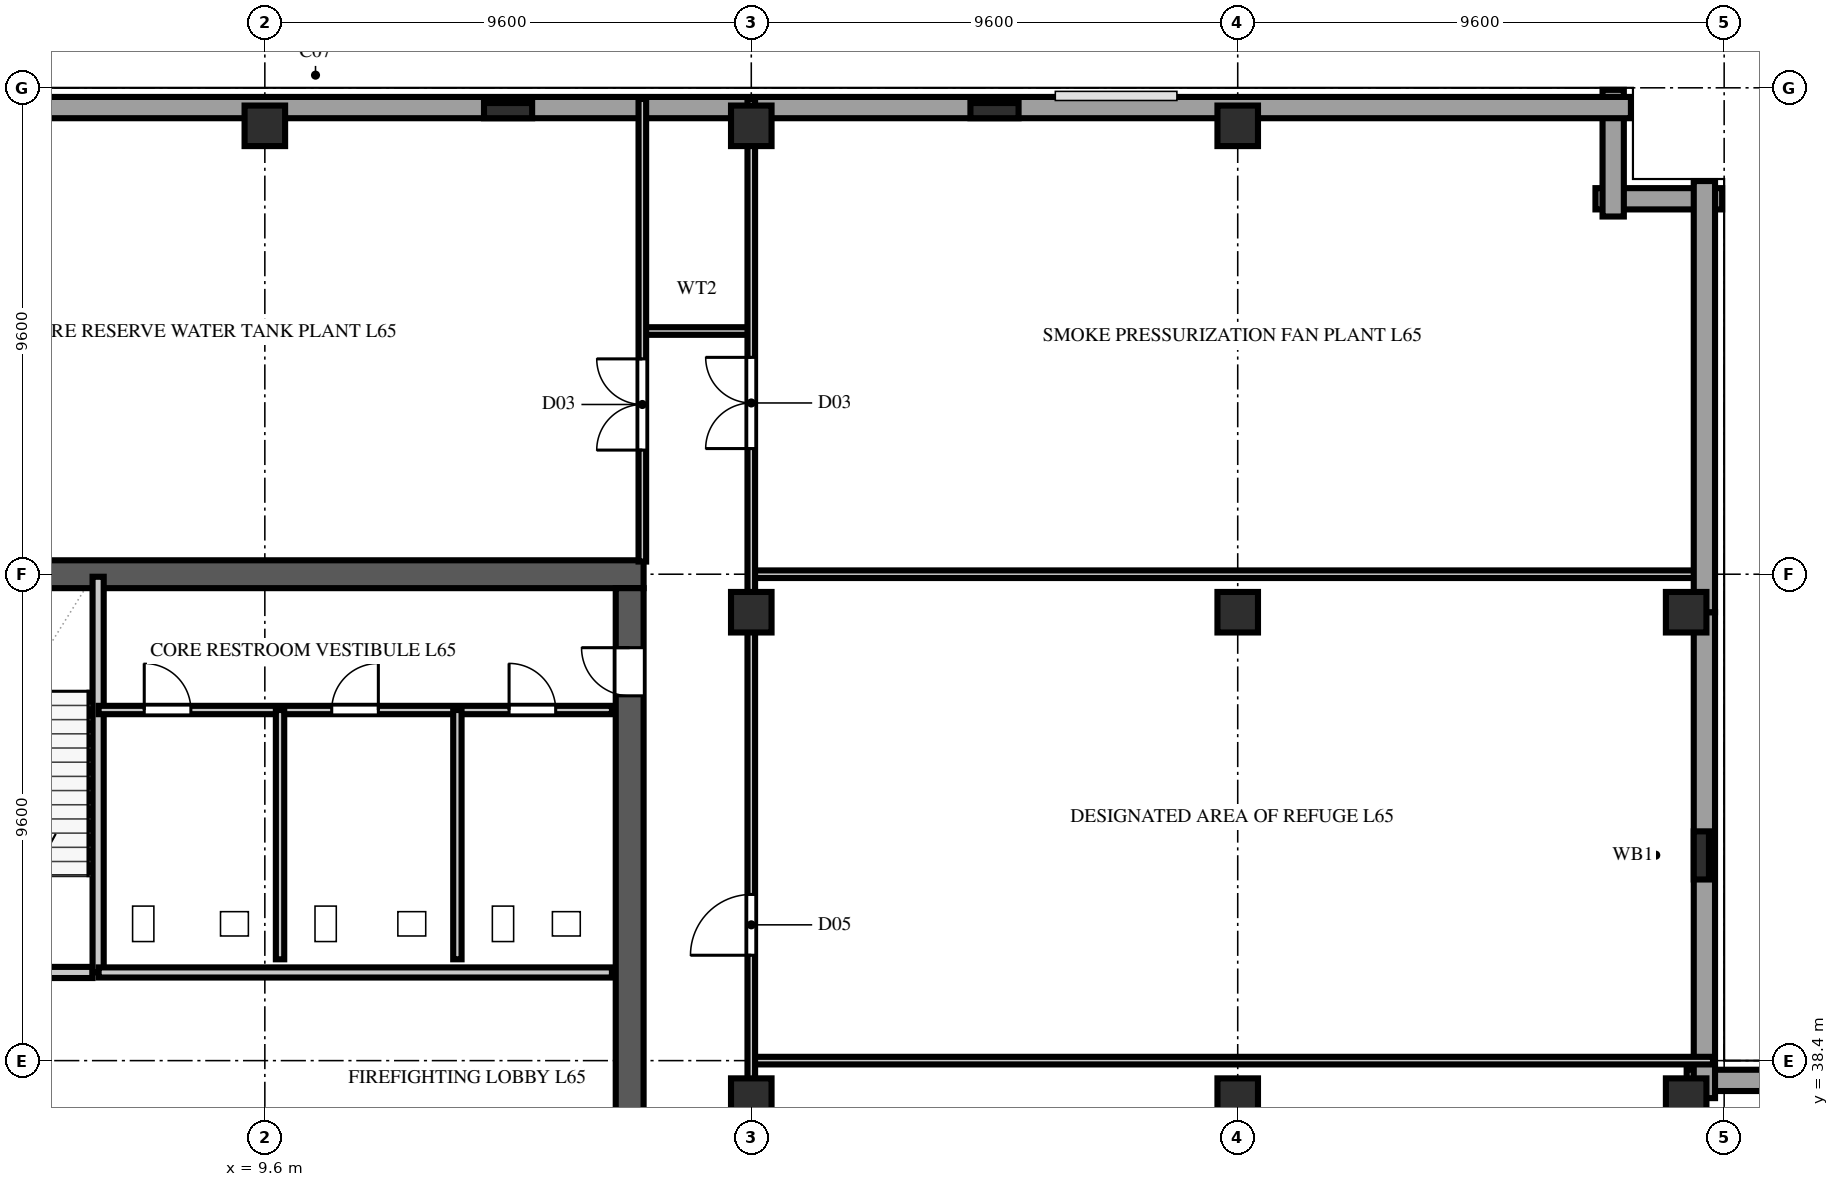
"""IFC4 building model, lengths in metres.
Left out: names, types, materials, properties, quantities, classifications, styles, units other than length and angle.
Written with IfcOpenShell. Run it as: python <this file> out.ifc"""

import sys

from ifc_helpers import new_model, si_unit, direction, frame, frame_2d, origin, origin_2d, place, context, subcontext, project, spatial, rectangle, extrude, element, fill, save


model = new_model("IFC4")
c1 = context("Model", 3, precision=1e-05, world=origin(), true_north=direction((0.0, 1.0)))
c2 = subcontext(c1, "Body", "Model", "MODEL_VIEW")
j1 = project(units=[si_unit("LENGTHUNIT", "METRE"), si_unit("PLANEANGLEUNIT", "RADIAN")], contexts=[c1])
p1 = place(None, origin())
s1 = spatial("IfcSite", under=j1, at=p1, CompositionType="ELEMENT")
p2 = place(p1, origin())
s2 = spatial("IfcBuilding", under=s1, at=p2, CompositionType="ELEMENT")
p3 = place(p2, frame((0.0, 0.0, 256.0)))
s3 = spatial("IfcBuildingStorey", under=s2, at=p3, CompositionType="ELEMENT", Elevation=256.0)
p4 = place(p3, frame((2.475, 48.0, 0.0), z_axis=(0.0, 0.0, 1.0), x_axis=(1.0, 0.0, 0.0)))
e1 = element("IfcWall", 1, at=p4, inside=s3, PredefinedType="SHEAR", context=c2, shape_type="SweptSolid", body=[
    extrude(rectangle(XDim=14.6, YDim=0.55, at=frame_2d((7.3, 0.0))), origin(), (0.0, 0.0, 1.0), 4.74),
])
p5 = place(p3, frame((16.8, 36.4, 0.0), z_axis=(0.0, 0.0, 1.0), x_axis=(0.0, 1.0, 0.0)))
e2 = element("IfcWall", 2, at=p5, inside=s3, PredefinedType="SHEAR", context=c2, shape_type="SweptSolid", body=[
    extrude(rectangle(XDim=11.325, YDim=0.55, at=frame_2d((5.663, 0.0))), origin(), (0.0, 0.0, 1.0), 4.74),
])
p6 = place(p5, frame((9.2, 0.0, 0.0)))
e3 = element("IfcOpeningElement", 3, at=p6, cuts=e2, PredefinedType="OPENING", context=c2, shape_type="SweptSolid", body=[
    extrude(rectangle(XDim=0.95, YDim=2.15, at=frame_2d((0.475, 1.075))), frame((0.0, 0.287, 0.0), z_axis=(0.0, -1.0, 0.0), x_axis=(1.0, 0.0, 0.0)), (0.0, 0.0, 1.0), 0.574),
])
p7 = place(p3, frame((9.6, 56.85, 0.0), z_axis=(0.0, 0.0, 1.0), x_axis=(1.0, 0.0, 0.0)))
e4 = element("IfcColumn", 4, at=p7, inside=s3, PredefinedType="COLUMN", context=c2, shape_type="SweptSolid", body=[
    extrude(rectangle(XDim=0.8, YDim=0.8, at=origin_2d()), origin(), (0.0, 0.0, 1.0), 4.7),
])
for number, where, z_axis, x_axis in (
    (5, (19.2, 37.65, 0.0), (0.0, 0.0, 1.0), (1.0, 0.0, 0.0)),
    (6, (19.2, 47.25, 0.0), (0.0, 0.0, 1.0), (1.0, 0.0, 0.0)),
):
    element("IfcColumn", number, at=place(p3, frame(where, z_axis=z_axis, x_axis=x_axis)), inside=s3, PredefinedType="COLUMN", context=c2, shape_type="SweptSolid", body=[
        extrude(rectangle(XDim=0.8, YDim=0.8, at=origin_2d()), origin(), (0.0, 0.0, 1.0), 5.0),
    ])
p8 = place(p3, frame((19.2, 56.85, 0.0), z_axis=(0.0, 0.0, 1.0), x_axis=(1.0, 0.0, 0.0)))
e7 = element("IfcColumn", 7, at=p8, inside=s3, PredefinedType="COLUMN", context=c2, shape_type="SweptSolid", body=[
    extrude(rectangle(XDim=0.8, YDim=0.8, at=origin_2d()), origin(), (0.0, 0.0, 1.0), 4.7),
])
for number, where, z_axis, x_axis in (
    (8, (28.8, 37.65, 0.0), (0.0, 0.0, 1.0), (1.0, 0.0, 0.0)),
    (9, (28.8, 47.25, 0.0), (0.0, 0.0, 1.0), (1.0, 0.0, 0.0)),
):
    element("IfcColumn", number, at=place(p3, frame(where, z_axis=z_axis, x_axis=x_axis)), inside=s3, PredefinedType="COLUMN", context=c2, shape_type="SweptSolid", body=[
        extrude(rectangle(XDim=0.8, YDim=0.8, at=origin_2d()), origin(), (0.0, 0.0, 1.0), 5.0),
    ])
p9 = place(p3, frame((28.8, 56.85, 0.0), z_axis=(0.0, 0.0, 1.0), x_axis=(1.0, 0.0, 0.0)))
e10 = element("IfcColumn", 10, at=p9, inside=s3, PredefinedType="COLUMN", context=c2, shape_type="SweptSolid", body=[
    extrude(rectangle(XDim=0.8, YDim=0.8, at=origin_2d()), origin(), (0.0, 0.0, 1.0), 4.7),
])
for number, where, z_axis, x_axis in (
    (11, (37.65, 37.65, 0.0), (0.0, 0.0, 1.0), (1.0, 0.0, 0.0)),
    (12, (37.65, 47.25, 0.0), (0.0, 0.0, 1.0), (1.0, 0.0, 0.0)),
):
    element("IfcColumn", number, at=place(p3, frame(where, z_axis=z_axis, x_axis=x_axis)), inside=s3, PredefinedType="COLUMN", context=c2, shape_type="SweptSolid", body=[
        extrude(rectangle(XDim=0.8, YDim=0.8, at=origin_2d()), origin(), (0.0, 0.0, 1.0), 5.0),
    ])
for number, where, z_axis, x_axis in (
    (13, (14.4, 57.15, 0.0), (0.0, 0.0, 1.0), (1.0, 0.0, 0.0)),
    (14, (24.0, 57.15, 0.0), (0.0, 0.0, 1.0), (1.0, 0.0, 0.0)),
):
    element("IfcColumn", number, at=place(p3, frame(where, z_axis=z_axis, x_axis=x_axis)), inside=s3, PredefinedType="PILASTER", context=c2, shape_type="SweptSolid", body=[
        extrude(rectangle(XDim=0.95, YDim=0.3, at=origin_2d()), origin(), (0.0, 0.0, 1.0), 4.7),
    ])
p10 = place(p3, frame((37.95, 42.45, 0.0), z_axis=(0.0, 0.0, 1.0), x_axis=(0.0, 1.0, 0.0)))
e15 = element("IfcColumn", 15, at=p10, inside=s3, PredefinedType="PILASTER", context=c2, shape_type="SweptSolid", body=[
    extrude(rectangle(XDim=0.95, YDim=0.3, at=origin_2d()), origin(), (0.0, 0.0, 1.0), 5.0),
])
p11 = place(p3, frame((55.76, 38.01, 0.0), z_axis=(0.0, 0.0, 1.0), x_axis=(-1.0, 0.0, 0.0)))
e16 = element("IfcWall", 16, at=p11, inside=s3, PredefinedType="SOLIDWALL", context=c2, shape_type="SweptSolid", body=[
    extrude(rectangle(XDim=18.1, YDim=0.42, at=frame_2d((9.05, 0.0))), origin(), (0.0, 0.0, 1.0), 4.74),
])
p12 = place(p3, frame((38.01, 37.66, 0.0), z_axis=(0.0, 0.0, 1.0), x_axis=(0.0, 1.0, 0.0)))
e17 = element("IfcWall", 17, at=p12, inside=s3, PredefinedType="SOLIDWALL", context=c2, shape_type="SweptSolid", body=[
    extrude(rectangle(XDim=9.59, YDim=0.42, at=frame_2d((4.795, 0.0))), origin(), (0.0, 0.0, 1.0), 3.34),
])
for number, where, z_axis, x_axis in (
    (18, (38.36, 55.41, 0.0), (0.0, 0.0, 1.0), (-1.0, 0.0, 0.0)),
    (19, (36.21, 55.06, 0.0), (0.0, 0.0, 1.0), (0.0, 1.0, 0.0)),
):
    element("IfcWall", number, at=place(p3, frame(where, z_axis=z_axis, x_axis=x_axis)), inside=s3, PredefinedType="SOLIDWALL", context=c2, shape_type="SweptSolid", body=[
        extrude(rectangle(XDim=2.5, YDim=0.42, at=frame_2d((1.25, 0.0))), origin(), (0.0, 0.0, 1.0), 4.7),
    ])
p13 = place(p3, frame((36.56, 57.21, 0.0), z_axis=(0.0, 0.0, 1.0), x_axis=(-1.0, 0.0, 0.0)))
e20 = element("IfcWall", 20, at=p13, inside=s3, PredefinedType="SOLIDWALL", context=c2, shape_type="SweptSolid", body=[
    extrude(rectangle(XDim=34.72, YDim=0.42, at=frame_2d((17.36, 0.0))), origin(), (0.0, 0.0, 1.0), 4.7),
])
p14 = place(p3, frame((2.65, 40.14, 0.0), z_axis=(0.0, 0.0, 1.0), x_axis=(1.0, 0.0, 0.0)))
e21 = element("IfcWall", 21, at=p14, inside=s3, PredefinedType="SOLIDWALL", context=c2, shape_type="SweptSolid", body=[
    extrude(rectangle(XDim=3.55, YDim=0.22, at=frame_2d((1.775, 0.0))), origin(), (0.0, 0.0, 1.0), 4.74),
])
p15 = place(p14, frame((1.2, 0.0, 0.0)))
e22 = element("IfcOpeningElement", 22, at=p15, cuts=e21, PredefinedType="OPENING", context=c2, shape_type="SweptSolid", body=[
    extrude(rectangle(XDim=1.1, YDim=2.2, at=frame_2d((0.55, 1.1))), frame((0.0, 0.122, 0.0), z_axis=(0.0, -1.0, 0.0), x_axis=(1.0, 0.0, 0.0)), (0.0, 0.0, 1.0), 0.244),
])
p16 = place(p3, frame((6.31, 40.14, 0.0), z_axis=(0.0, 0.0, 1.0), x_axis=(0.0, 1.0, 0.0)))
e23 = element("IfcWall", 23, at=p16, inside=s3, PredefinedType="SOLIDWALL", context=c2, shape_type="SweptSolid", body=[
    extrude(rectangle(XDim=7.81, YDim=0.22, at=frame_2d((3.905, 0.0))), origin(), (0.0, 0.0, 1.0), 4.74),
])
p17 = place(p3, frame((6.32, 40.14, 0.0), z_axis=(0.0, 0.0, 1.0), x_axis=(1.0, 0.0, 0.0)))
e24 = element("IfcWall", 24, at=p17, inside=s3, PredefinedType="SOLIDWALL", context=c2, shape_type="SweptSolid", body=[
    extrude(rectangle(XDim=10.13, YDim=0.2, at=frame_2d((5.065, 0.0))), origin(), (0.0, 0.0, 1.0), 4.74),
])
p18 = place(p3, frame((6.32, 45.32, 0.0), z_axis=(0.0, 0.0, 1.0), x_axis=(1.0, 0.0, 0.0)))
e25 = element("IfcWall", 25, at=p18, inside=s3, PredefinedType="PLUMBINGWALL", context=c2, shape_type="SweptSolid", body=[
    extrude(rectangle(XDim=10.13, YDim=0.165, at=frame_2d((5.065, 0.0))), origin(), (0.0, 0.0, 1.0), 4.74),
])
p19 = place(p18, frame((0.9, 0.0, 0.0)))
e26 = element("IfcOpeningElement", 26, at=p19, cuts=e25, PredefinedType="OPENING", context=c2, shape_type="SweptSolid", body=[
    extrude(rectangle(XDim=0.92, YDim=2.15, at=frame_2d((0.46, 1.075))), frame((0.0, 0.094, 0.0), z_axis=(0.0, -1.0, 0.0), x_axis=(1.0, 0.0, 0.0)), (0.0, 0.0, 1.0), 0.189),
])
p20 = place(p18, frame((4.6, 0.0, 0.0)))
e27 = element("IfcOpeningElement", 27, at=p20, cuts=e25, PredefinedType="OPENING", context=c2, shape_type="SweptSolid", body=[
    extrude(rectangle(XDim=0.92, YDim=2.15, at=frame_2d((0.46, 1.075))), frame((0.0, 0.094, 0.0), z_axis=(0.0, -1.0, 0.0), x_axis=(1.0, 0.0, 0.0)), (0.0, 0.0, 1.0), 0.189),
])
p21 = place(p18, frame((8.1, 0.0, 0.0)))
e28 = element("IfcOpeningElement", 28, at=p21, cuts=e25, PredefinedType="OPENING", context=c2, shape_type="SweptSolid", body=[
    extrude(rectangle(XDim=0.92, YDim=2.15, at=frame_2d((0.46, 1.075))), frame((0.0, 0.094, 0.0), z_axis=(0.0, -1.0, 0.0), x_axis=(1.0, 0.0, 0.0)), (0.0, 0.0, 1.0), 0.189),
])
for number, where, z_axis, x_axis in (
    (29, (9.9, 40.4, 0.0), (0.0, 0.0, 1.0), (0.0, 1.0, 0.0)),
    (30, (13.4, 40.4, 0.0), (0.0, 0.0, 1.0), (0.0, 1.0, 0.0)),
):
    element("IfcWall", number, at=place(p3, frame(where, z_axis=z_axis, x_axis=x_axis)), inside=s3, PredefinedType="PLUMBINGWALL", context=c2, shape_type="SweptSolid", body=[
        extrude(rectangle(XDim=4.92, YDim=0.165, at=frame_2d((2.46, 0.0))), origin(), (0.0, 0.0, 1.0), 4.74),
    ])
p22 = place(p3, frame((17.05, 52.8, 0.0), z_axis=(0.0, 0.0, 1.0), x_axis=(1.0, 0.0, 0.0)))
e31 = element("IfcWall", 31, at=p22, inside=s3, PredefinedType="PARTITIONING", context=c2, shape_type="SweptSolid", body=[
    extrude(rectangle(XDim=2.15, YDim=0.15, at=frame_2d((1.075, 0.0))), origin(), (0.0, 0.0, 1.0), 4.7),
])
p23 = place(p3, frame((19.2, 38.4, 0.0), z_axis=(0.0, 0.0, 1.0), x_axis=(1.0, 0.0, 0.0)))
e32 = element("IfcWall", 32, at=p23, inside=s3, PredefinedType="PARTITIONING", context=c2, shape_type="SweptSolid", body=[
    extrude(rectangle(XDim=18.98, YDim=0.15, at=frame_2d((9.49, 0.0))), origin(), (0.0, 0.0, 1.0), 4.74),
])
p24 = place(p3, frame((19.2, 48.0, 0.0), z_axis=(0.0, 0.0, 1.0), x_axis=(1.0, 0.0, 0.0)))
e33 = element("IfcWall", 33, at=p24, inside=s3, PredefinedType="PARTITIONING", context=c2, shape_type="SweptSolid", body=[
    extrude(rectangle(XDim=18.98, YDim=0.15, at=frame_2d((9.49, 0.0))), origin(), (0.0, 0.0, 1.0), 4.7),
])
p25 = place(p3, frame((19.2, 9.98, 0.0), z_axis=(0.0, 0.0, 1.0), x_axis=(0.0, 1.0, 0.0)))
e34 = element("IfcWall", 34, at=p25, inside=s3, PredefinedType="PARTITIONING", context=c2, shape_type="SweptSolid", body=[
    extrude(rectangle(XDim=37.27, YDim=0.15, at=frame_2d((18.635, 0.0))), origin(), (0.0, 0.0, 1.0), 3.967),
])
p26 = place(p25, frame((2.0, 0.0, 0.0)))
e35 = element("IfcOpeningElement", 35, at=p26, cuts=e34, PredefinedType="OPENING", context=c2, shape_type="SweptSolid", body=[
    extrude(rectangle(XDim=1.8, YDim=2.2, at=frame_2d((0.9, 1.1))), frame((0.0, 0.087, 0.0), z_axis=(0.0, -1.0, 0.0), x_axis=(1.0, 0.0, 0.0)), (0.0, 0.0, 1.0), 0.174),
])
p27 = place(p25, frame((12.0, 0.0, 0.0)))
e36 = element("IfcOpeningElement", 36, at=p27, cuts=e34, PredefinedType="OPENING", context=c2, shape_type="SweptSolid", body=[
    extrude(rectangle(XDim=1.8, YDim=2.2, at=frame_2d((0.9, 1.1))), frame((0.0, 0.087, 0.0), z_axis=(0.0, -1.0, 0.0), x_axis=(1.0, 0.0, 0.0)), (0.0, 0.0, 1.0), 0.174),
])
p28 = place(p25, frame((30.5, 0.0, 0.0)))
e37 = element("IfcOpeningElement", 37, at=p28, cuts=e34, PredefinedType="OPENING", context=c2, shape_type="SweptSolid", body=[
    extrude(rectangle(XDim=1.2, YDim=2.2, at=frame_2d((0.6, 1.1))), frame((0.0, 0.087, 0.0), z_axis=(0.0, -1.0, 0.0), x_axis=(1.0, 0.0, 0.0)), (0.0, 0.0, 1.0), 0.174),
])
p29 = place(p3, frame((19.2, 47.25, 0.0), z_axis=(0.0, 0.0, 1.0), x_axis=(0.0, 1.0, 0.0)))
e38 = element("IfcWall", 38, at=p29, inside=s3, PredefinedType="PARTITIONING", context=c2, shape_type="SweptSolid", body=[
    extrude(rectangle(XDim=9.6, YDim=0.15, at=frame_2d((4.8, 0.0))), origin(), (0.0, 0.0, 1.0), 3.927),
])
p30 = place(p29, frame((3.23, 0.0, 0.0)))
e39 = element("IfcOpeningElement", 39, at=p30, cuts=e38, PredefinedType="OPENING", context=c2, shape_type="SweptSolid", body=[
    extrude(rectangle(XDim=1.8, YDim=2.2, at=frame_2d((0.9, 1.1))), frame((0.0, 0.087, 0.0), z_axis=(0.0, -1.0, 0.0), x_axis=(1.0, 0.0, 0.0)), (0.0, 0.0, 1.0), 0.174),
])
p31 = place(p3, frame((19.2, 56.85, 0.0), z_axis=(0.0, 0.0, 1.0), x_axis=(0.0, 1.0, 0.0)))
e40 = element("IfcWall", 40, at=p31, inside=s3, PredefinedType="PARTITIONING", context=c2, shape_type="SweptSolid", body=[
    extrude(rectangle(XDim=0.53, YDim=0.15, at=frame_2d((0.265, 0.0))), origin(), (0.0, 0.0, 1.0), 4.74),
])
p32 = place(p3, frame((17.05, 48.25, 0.0), z_axis=(0.0, 0.0, 1.0), x_axis=(0.0, 1.0, 0.0)))
e41 = element("IfcWall", 41, at=p32, inside=s3, PredefinedType="PARTITIONING", context=c2, shape_type="SweptSolid", body=[
    extrude(rectangle(XDim=9.13, YDim=0.15, at=frame_2d((4.565, 0.0))), origin(), (0.0, 0.0, 1.0), 4.7),
])
p33 = place(p32, frame((2.2, 0.0, 0.0)))
e42 = element("IfcOpeningElement", 42, at=p33, cuts=e41, PredefinedType="OPENING", context=c2, shape_type="SweptSolid", body=[
    extrude(rectangle(XDim=1.8, YDim=2.2, at=frame_2d((0.9, 1.1))), frame((0.0, 0.087, 0.0), z_axis=(0.0, -1.0, 0.0), x_axis=(1.0, 0.0, 0.0)), (0.0, 0.0, 1.0), 0.174),
])
p34 = place(p3, frame((38.01, 47.25, 0.0), z_axis=(0.0, 0.0, 1.0), x_axis=(0.0, 1.0, 0.0)))
e43 = element("IfcWall", 43, at=p34, inside=s3, PredefinedType="SOLIDWALL", context=c2, shape_type="SweptSolid", body=[
    extrude(rectangle(XDim=8.51, YDim=0.42, at=frame_2d((4.255, 0.0))), origin(), (0.0, 0.0, 1.0), 4.74),
])
p35 = place(p6, origin())
e44 = element("IfcDoor", 44, at=p35, inside=s3, OperationType="SINGLE_SWING_RIGHT", PredefinedType="DOOR", context=c2, shape_type="SweptSolid", body=[
    extrude(rectangle(XDim=0.95, YDim=2.15, at=frame_2d((0.475, 1.075))), frame((0.0, 0.025, 0.0), z_axis=(0.0, -1.0, 0.0), x_axis=(1.0, 0.0, 0.0)), (0.0, 0.0, 1.0), 0.05),
])
fill(e3, e44)
p36 = place(p19, origin())
e45 = element("IfcDoor", 45, at=p36, inside=s3, OperationType="SINGLE_SWING_LEFT", PredefinedType="DOOR", context=c2, shape_type="SweptSolid", body=[
    extrude(rectangle(XDim=0.92, YDim=2.15, at=frame_2d((0.46, 1.075))), frame((0.0, 0.025, 0.0), z_axis=(0.0, -1.0, 0.0), x_axis=(1.0, 0.0, 0.0)), (0.0, 0.0, 1.0), 0.05),
])
fill(e26, e45)
p37 = place(p20, origin())
e46 = element("IfcDoor", 46, at=p37, inside=s3, OperationType="SINGLE_SWING_RIGHT", PredefinedType="DOOR", context=c2, shape_type="SweptSolid", body=[
    extrude(rectangle(XDim=0.92, YDim=2.15, at=frame_2d((0.46, 1.075))), frame((0.0, 0.025, 0.0), z_axis=(0.0, -1.0, 0.0), x_axis=(1.0, 0.0, 0.0)), (0.0, 0.0, 1.0), 0.05),
])
fill(e27, e46)
p38 = place(p21, origin())
e47 = element("IfcDoor", 47, at=p38, inside=s3, OperationType="SINGLE_SWING_LEFT", PredefinedType="DOOR", context=c2, shape_type="SweptSolid", body=[
    extrude(rectangle(XDim=0.92, YDim=2.15, at=frame_2d((0.46, 1.075))), frame((0.0, 0.025, 0.0), z_axis=(0.0, -1.0, 0.0), x_axis=(1.0, 0.0, 0.0)), (0.0, 0.0, 1.0), 0.05),
])
fill(e28, e47)
p39 = place(p28, origin())
e48 = element("IfcDoor", 48, at=p39, inside=s3, OperationType="SINGLE_SWING_LEFT", PredefinedType="DOOR", context=c2, shape_type="SweptSolid", body=[
    extrude(rectangle(XDim=1.2, YDim=2.2, at=frame_2d((0.6, 1.1))), frame((0.0, 0.025, 0.0), z_axis=(0.0, -1.0, 0.0), x_axis=(1.0, 0.0, 0.0)), (0.0, 0.0, 1.0), 0.05),
])
fill(e37, e48)
p40 = place(p30, origin())
e49 = element("IfcDoor", 49, at=p40, inside=s3, OperationType="DOUBLE_DOOR_SINGLE_SWING", PredefinedType="DOOR", context=c2, shape_type="SweptSolid", body=[
    extrude(rectangle(XDim=1.8, YDim=2.2, at=frame_2d((0.9, 1.1))), frame((0.0, 0.025, 0.0), z_axis=(0.0, -1.0, 0.0), x_axis=(1.0, 0.0, 0.0)), (0.0, 0.0, 1.0), 0.05),
])
fill(e39, e49)
p41 = place(p33, origin())
e50 = element("IfcDoor", 50, at=p41, inside=s3, OperationType="DOUBLE_DOOR_SINGLE_SWING", PredefinedType="DOOR", context=c2, shape_type="SweptSolid", body=[
    extrude(rectangle(XDim=1.8, YDim=2.2, at=frame_2d((0.9, 1.1))), frame((0.0, 0.025, 0.0), z_axis=(0.0, -1.0, 0.0), x_axis=(1.0, 0.0, 0.0)), (0.0, 0.0, 1.0), 0.05),
])
fill(e42, e50)
save(model, sys.argv[1])
